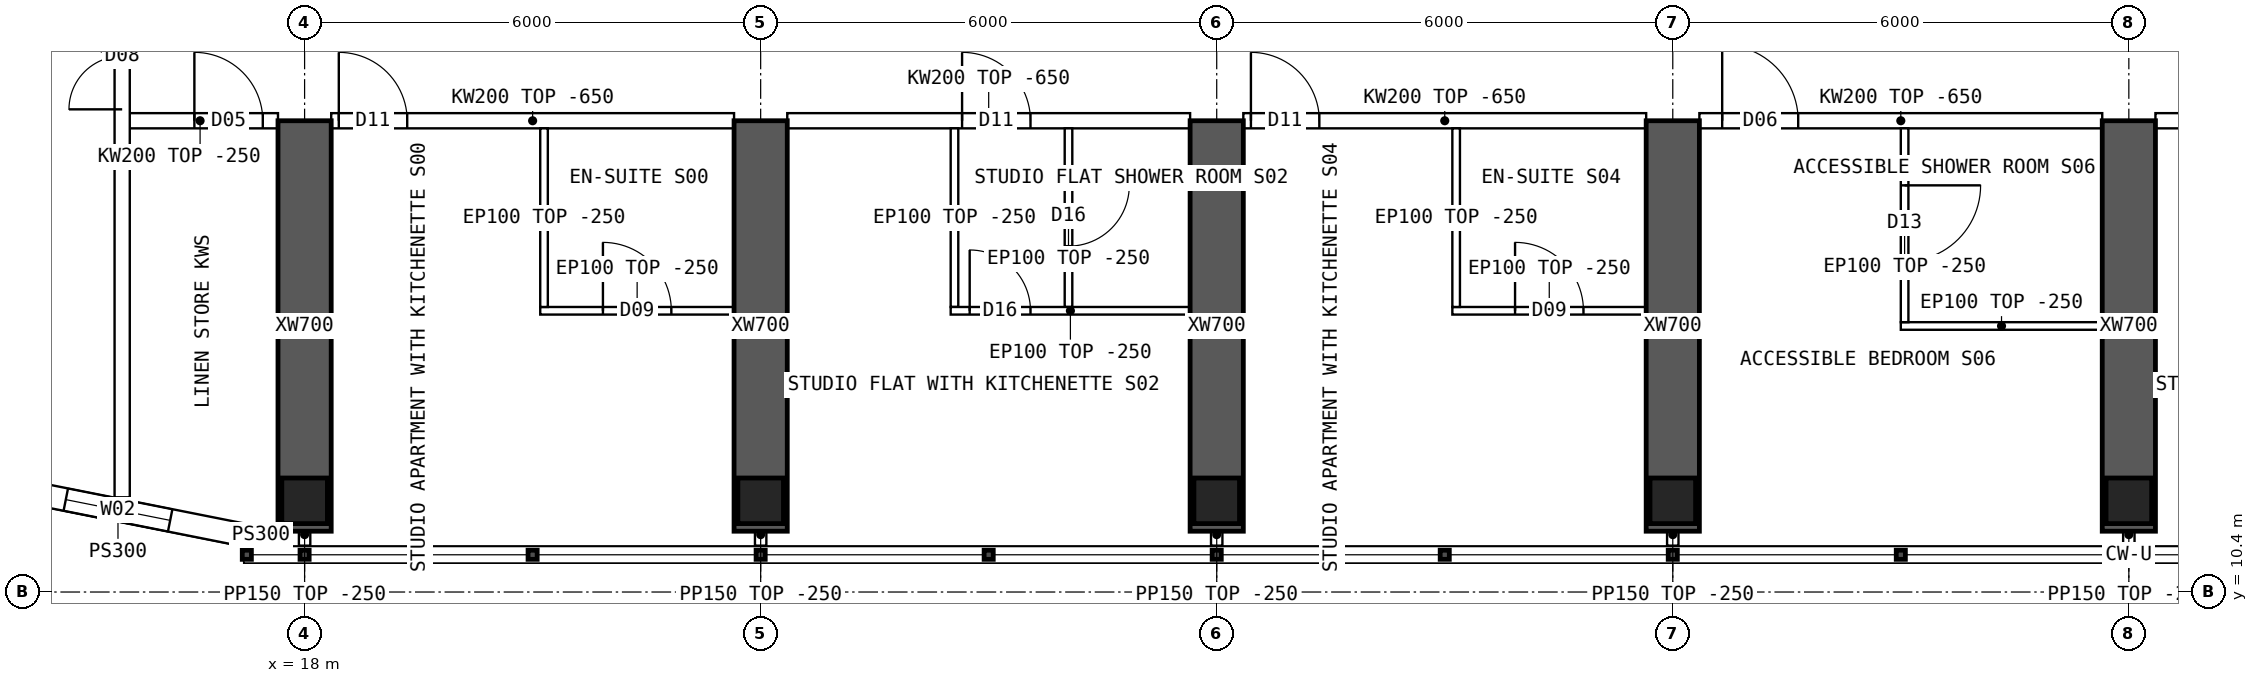
"""IFC4 building model, lengths in metres.
Left out: names, types, materials, properties, quantities, classifications, styles, units other than length and angle.
Written with IfcOpenShell. Run it as: python <this file> out.ifc"""

import sys

from ifc_helpers import new_model, si_unit, direction, frame, frame_2d, origin, origin_2d, place, context, subcontext, project, spatial, polyline, rectangle, hollow_rectangle, outline, extrude, element, fill, save


model = new_model("IFC4")
c1 = context("Model", 3, precision=1e-05, world=origin(), true_north=direction((0.0, 1.0)))
c2 = subcontext(c1, "Body", "Model", "MODEL_VIEW")
j1 = project(units=[si_unit("LENGTHUNIT", "METRE"), si_unit("PLANEANGLEUNIT", "RADIAN")], contexts=[c1])
p1 = place(None, origin())
s1 = spatial("IfcSite", under=j1, at=p1, CompositionType="ELEMENT")
p2 = place(p1, origin())
s2 = spatial("IfcBuilding", under=s1, at=p2, CompositionType="ELEMENT")
p3 = place(p2, frame((0.0, 0.0, 220.3)))
s3 = spatial("IfcBuildingStorey", under=s2, at=p3, CompositionType="ELEMENT", Elevation=220.3)
for number, where, z_axis, x_axis in (
    (1, (18.0, 11.6, 0.0), (0.0, 0.0, 1.0), (1.0, 0.0, 0.0)),
    (2, (24.0, 11.6, 0.0), (0.0, 0.0, 1.0), (1.0, 0.0, 0.0)),
    (3, (30.0, 11.6, 0.0), (0.0, 0.0, 1.0), (1.0, 0.0, 0.0)),
    (4, (36.0, 11.6, 0.0), (0.0, 0.0, 1.0), (1.0, 0.0, 0.0)),
    (5, (42.0, 11.6, 0.0), (0.0, 0.0, 1.0), (1.0, 0.0, 0.0)),
):
    element("IfcColumn", number, at=place(p3, frame(where, z_axis=z_axis, x_axis=x_axis)), inside=s3, PredefinedType="COLUMN", context=c2, shape_type="SweptSolid", body=[
        extrude(hollow_rectangle(XDim=0.6, YDim=0.6, WallThickness=0.06, at=origin_2d()), origin(), (0.0, 0.0, 1.0), 3.75),
    ])
for number, where, z_axis, x_axis in (
    (6, (18.0, 11.2, 0.0), (0.0, 0.0, 1.0), (0.0, 1.0, 0.0)),
    (7, (24.0, 11.2, 0.0), (0.0, 0.0, 1.0), (0.0, 1.0, 0.0)),
    (8, (30.0, 11.2, 0.0), (0.0, 0.0, 1.0), (0.0, 1.0, 0.0)),
    (9, (36.0, 11.2, 0.0), (0.0, 0.0, 1.0), (0.0, 1.0, 0.0)),
    (10, (42.0, 11.2, 0.0), (0.0, 0.0, 1.0), (0.0, 1.0, 0.0)),
):
    element("IfcWall", number, at=place(p3, frame(where, z_axis=z_axis, x_axis=x_axis)), inside=s3, PredefinedType="SHEAR", context=c2, shape_type="SweptSolid", body=[
        extrude(rectangle(XDim=5.4, YDim=0.7, at=frame_2d((2.7, 0.0))), origin(), (0.0, 0.0, 1.0), 3.75),
    ])
p4 = place(p3, frame((13.89, 11.808, 0.0), z_axis=(0.0, 0.0, 1.0), x_axis=(0.98078325777, -0.195100490205, 0.0)))
e11 = element("IfcWall", 11, at=p4, inside=s3, PredefinedType="SOLIDWALL", context=c2, shape_type="SweptSolid", body=[
    extrude(outline(polyline([(-0.03, -0.15), (3.405, -0.15), (3.345, 0.15), (0.03, 0.15), (-0.03, -0.15)])), origin(), (0.0, 0.0, 1.0), 3.5),
])
p5 = place(p4, frame((0.988, 0.0, 0.9)))
e12 = element("IfcOpeningElement", 12, at=p5, cuts=e11, PredefinedType="OPENING", context=c2, shape_type="SweptSolid", body=[
    extrude(rectangle(XDim=1.4, YDim=1.8, at=frame_2d((0.7, 0.9))), frame((0.0, 0.16, 0.0), z_axis=(0.0, -1.0, 0.0), x_axis=(1.0, 0.0, 0.0)), (0.0, 0.0, 1.0), 0.32),
])
p6 = place(p3, frame((17.2, 11.15, 0.0), z_axis=(0.0, 0.0, 1.0), x_axis=(1.0, 0.0, 0.0)))
e13 = element("IfcWall", 13, at=p6, inside=s3, PredefinedType="SOLIDWALL", context=c2, shape_type="SweptSolid", body=[
    extrude(rectangle(XDim=0.45, YDim=0.3, at=frame_2d((0.225, 0.0))), origin(), (0.0, 0.0, 1.0), 3.5),
])
p7 = place(p3, frame((15.6, 16.6, 0.0), z_axis=(0.0, 0.0, 1.0), x_axis=(1.0, 0.0, 0.0)))
e14 = element("IfcWall", 14, at=p7, inside=s3, PredefinedType="SOLIDWALL", context=c2, shape_type="SweptSolid", body=[
    extrude(rectangle(XDim=2.05, YDim=0.2, at=frame_2d((1.025, 0.0))), origin(), (0.0, 0.0, 1.0), 3.5),
])
p8 = place(p7, frame((0.95, 0.0, 0.0)))
e15 = element("IfcOpeningElement", 15, at=p8, cuts=e14, PredefinedType="OPENING", context=c2, shape_type="SweptSolid", body=[
    extrude(rectangle(XDim=0.9, YDim=2.1, at=frame_2d((0.45, 1.05))), frame((0.0, 0.11, 0.0), z_axis=(0.0, -1.0, 0.0), x_axis=(1.0, 0.0, 0.0)), (0.0, 0.0, 1.0), 0.22),
])
p9 = place(p3, frame((18.35, 16.6, 0.0), z_axis=(0.0, 0.0, 1.0), x_axis=(1.0, 0.0, 0.0)))
e16 = element("IfcWall", 16, at=p9, inside=s3, PredefinedType="SOLIDWALL", context=c2, shape_type="SweptSolid", body=[
    extrude(outline(polyline([(0.0, 0.0), (5.3, 0.0), (5.3, 3.1), (0.0, 3.1), (0.0, 0.0)])), frame((0.0, 0.1, 0.0), z_axis=(0.0, -1.0, 0.0), x_axis=(1.0, 0.0, 0.0)), (0.0, 0.0, 1.0), 0.2),
])
p10 = place(p9, frame((0.1, 0.0, 0.0)))
e17 = element("IfcOpeningElement", 17, at=p10, cuts=e16, PredefinedType="OPENING", context=c2, shape_type="SweptSolid", body=[
    extrude(rectangle(XDim=0.9, YDim=2.1, at=frame_2d((0.45, 1.05))), frame((0.0, 0.11, 0.0), z_axis=(0.0, -1.0, 0.0), x_axis=(1.0, 0.0, 0.0)), (0.0, 0.0, 1.0), 0.22),
])
p11 = place(p3, frame((24.35, 16.6, 0.0), z_axis=(0.0, 0.0, 1.0), x_axis=(1.0, 0.0, 0.0)))
e18 = element("IfcWall", 18, at=p11, inside=s3, PredefinedType="SOLIDWALL", context=c2, shape_type="SweptSolid", body=[
    extrude(outline(polyline([(0.0, 0.0), (5.3, 0.0), (5.3, 3.1), (0.0, 3.1), (0.0, 0.0)])), frame((0.0, 0.1, 0.0), z_axis=(0.0, -1.0, 0.0), x_axis=(1.0, 0.0, 0.0)), (0.0, 0.0, 1.0), 0.2),
])
p12 = place(p11, frame((2.3, 0.0, 0.0)))
e19 = element("IfcOpeningElement", 19, at=p12, cuts=e18, PredefinedType="OPENING", context=c2, shape_type="SweptSolid", body=[
    extrude(rectangle(XDim=0.9, YDim=2.1, at=frame_2d((0.45, 1.05))), frame((0.0, 0.11, 0.0), z_axis=(0.0, -1.0, 0.0), x_axis=(1.0, 0.0, 0.0)), (0.0, 0.0, 1.0), 0.22),
])
p13 = place(p3, frame((30.35, 16.6, 0.0), z_axis=(0.0, 0.0, 1.0), x_axis=(1.0, 0.0, 0.0)))
e20 = element("IfcWall", 20, at=p13, inside=s3, PredefinedType="SOLIDWALL", context=c2, shape_type="SweptSolid", body=[
    extrude(outline(polyline([(0.0, 0.0), (5.3, 0.0), (5.3, 3.1), (0.0, 3.1), (0.0, 0.0)])), frame((0.0, 0.1, 0.0), z_axis=(0.0, -1.0, 0.0), x_axis=(1.0, 0.0, 0.0)), (0.0, 0.0, 1.0), 0.2),
])
p14 = place(p13, frame((0.1, 0.0, 0.0)))
e21 = element("IfcOpeningElement", 21, at=p14, cuts=e20, PredefinedType="OPENING", context=c2, shape_type="SweptSolid", body=[
    extrude(rectangle(XDim=0.9, YDim=2.1, at=frame_2d((0.45, 1.05))), frame((0.0, 0.11, 0.0), z_axis=(0.0, -1.0, 0.0), x_axis=(1.0, 0.0, 0.0)), (0.0, 0.0, 1.0), 0.22),
])
p15 = place(p3, frame((36.35, 16.6, 0.0), z_axis=(0.0, 0.0, 1.0), x_axis=(1.0, 0.0, 0.0)))
e22 = element("IfcWall", 22, at=p15, inside=s3, PredefinedType="SOLIDWALL", context=c2, shape_type="SweptSolid", body=[
    extrude(outline(polyline([(0.0, 0.0), (5.3, 0.0), (5.3, 3.1), (0.0, 3.1), (0.0, 0.0)])), frame((0.0, 0.1, 0.0), z_axis=(0.0, -1.0, 0.0), x_axis=(1.0, 0.0, 0.0)), (0.0, 0.0, 1.0), 0.2),
])
p16 = place(p15, frame((0.3, 0.0, 0.0)))
e23 = element("IfcOpeningElement", 23, at=p16, cuts=e22, PredefinedType="OPENING", context=c2, shape_type="SweptSolid", body=[
    extrude(rectangle(XDim=1.0, YDim=2.1, at=frame_2d((0.5, 1.05))), frame((0.0, 0.11, 0.0), z_axis=(0.0, -1.0, 0.0), x_axis=(1.0, 0.0, 0.0)), (0.0, 0.0, 1.0), 0.22),
])
p17 = place(p3, frame((42.35, 16.6, 0.0), z_axis=(0.0, 0.0, 1.0), x_axis=(1.0, 0.0, 0.0)))
e24 = element("IfcWall", 24, at=p17, inside=s3, PredefinedType="SOLIDWALL", context=c2, shape_type="SweptSolid", body=[
    extrude(outline(polyline([(0.0, 0.0), (5.3, 0.0), (5.3, 3.1), (0.0, 3.1), (0.0, 0.0)])), frame((0.0, 0.1, 0.0), z_axis=(0.0, -1.0, 0.0), x_axis=(1.0, 0.0, 0.0)), (0.0, 0.0, 1.0), 0.2),
])
p18 = place(p17, frame((2.3, 0.0, 0.0)))
e25 = element("IfcOpeningElement", 25, at=p18, cuts=e24, PredefinedType="OPENING", context=c2, shape_type="SweptSolid", body=[
    extrude(rectangle(XDim=0.9, YDim=2.1, at=frame_2d((0.45, 1.05))), frame((0.0, 0.11, 0.0), z_axis=(0.0, -1.0, 0.0), x_axis=(1.0, 0.0, 0.0)), (0.0, 0.0, 1.0), 0.22),
])
p19 = place(p3, frame((23.65, 14.1, 0.0), z_axis=(0.0, 0.0, 1.0), x_axis=(-1.0, 0.0, 0.0)))
e26 = element("IfcWall", 26, at=p19, inside=s3, PredefinedType="PARTITIONING", context=c2, shape_type="SweptSolid", body=[
    extrude(rectangle(XDim=2.55, YDim=0.1, at=frame_2d((1.275, 0.0))), origin(), (0.0, 0.0, 1.0), 3.5),
])
p20 = place(p19, frame((0.825, 0.0, 0.0)))
e27 = element("IfcOpeningElement", 27, at=p20, cuts=e26, PredefinedType="OPENING", context=c2, shape_type="SweptSolid", body=[
    extrude(rectangle(XDim=0.9, YDim=2.1, at=frame_2d((0.45, 1.05))), frame((0.0, 0.06, 0.0), z_axis=(0.0, -1.0, 0.0), x_axis=(1.0, 0.0, 0.0)), (0.0, 0.0, 1.0), 0.12),
])
p21 = place(p3, frame((21.15, 14.15, 0.0), z_axis=(0.0, 0.0, 1.0), x_axis=(0.0, 1.0, 0.0)))
e28 = element("IfcWall", 28, at=p21, inside=s3, PredefinedType="PARTITIONING", context=c2, shape_type="SweptSolid", body=[
    extrude(outline(polyline([(0.0, 0.0), (2.35, 0.0), (2.35, 3.1), (2.302, 3.1), (2.3, 3.5), (0.0, 3.5), (0.0, 0.0)])), frame((0.0, 0.05, 0.0), z_axis=(0.0, -1.0, 0.0), x_axis=(1.0, 0.0, 0.0)), (0.0, 0.0, 1.0), 0.1),
])
p22 = place(p3, frame((29.65, 14.1, 0.0), z_axis=(0.0, 0.0, 1.0), x_axis=(-1.0, 0.0, 0.0)))
e29 = element("IfcWall", 29, at=p22, inside=s3, PredefinedType="PARTITIONING", context=c2, shape_type="SweptSolid", body=[
    extrude(rectangle(XDim=3.15, YDim=0.1, at=frame_2d((1.575, 0.0))), origin(), (0.0, 0.0, 1.0), 3.5),
])
p23 = place(p22, frame((2.1, 0.0, 0.0)))
e30 = element("IfcOpeningElement", 30, at=p23, cuts=e29, PredefinedType="OPENING", context=c2, shape_type="SweptSolid", body=[
    extrude(rectangle(XDim=0.8, YDim=2.1, at=frame_2d((0.4, 1.05))), frame((0.0, 0.06, 0.0), z_axis=(0.0, -1.0, 0.0), x_axis=(1.0, 0.0, 0.0)), (0.0, 0.0, 1.0), 0.12),
])
p24 = place(p3, frame((26.55, 14.15, 0.0), z_axis=(0.0, 0.0, 1.0), x_axis=(0.0, 1.0, 0.0)))
e31 = element("IfcWall", 31, at=p24, inside=s3, PredefinedType="PARTITIONING", context=c2, shape_type="SweptSolid", body=[
    extrude(outline(polyline([(0.0, 0.0), (2.35, 0.0), (2.35, 3.1), (2.302, 3.1), (2.3, 3.5), (0.0, 3.5), (0.0, 0.0)])), frame((0.0, 0.05, 0.0), z_axis=(0.0, -1.0, 0.0), x_axis=(1.0, 0.0, 0.0)), (0.0, 0.0, 1.0), 0.1),
])
p25 = place(p3, frame((28.05, 14.15, 0.0), z_axis=(0.0, 0.0, 1.0), x_axis=(0.0, 1.0, 0.0)))
e32 = element("IfcWall", 32, at=p25, inside=s3, PredefinedType="PARTITIONING", context=c2, shape_type="SweptSolid", body=[
    extrude(outline(polyline([(0.0, 0.0), (2.35, 0.0), (2.35, 3.1), (2.302, 3.1), (2.3, 3.5), (0.0, 3.5), (0.0, 0.0)])), frame((0.0, 0.05, 0.0), z_axis=(0.0, -1.0, 0.0), x_axis=(1.0, 0.0, 0.0)), (0.0, 0.0, 1.0), 0.1),
])
p26 = place(p25, frame((0.8, 0.0, 0.0)))
e33 = element("IfcOpeningElement", 33, at=p26, cuts=e32, PredefinedType="OPENING", context=c2, shape_type="SweptSolid", body=[
    extrude(rectangle(XDim=0.8, YDim=2.1, at=frame_2d((0.4, 1.05))), frame((0.0, 0.06, 0.0), z_axis=(0.0, -1.0, 0.0), x_axis=(1.0, 0.0, 0.0)), (0.0, 0.0, 1.0), 0.12),
])
p27 = place(p3, frame((35.65, 14.1, 0.0), z_axis=(0.0, 0.0, 1.0), x_axis=(-1.0, 0.0, 0.0)))
e34 = element("IfcWall", 34, at=p27, inside=s3, PredefinedType="PARTITIONING", context=c2, shape_type="SweptSolid", body=[
    extrude(rectangle(XDim=2.55, YDim=0.1, at=frame_2d((1.275, 0.0))), origin(), (0.0, 0.0, 1.0), 3.5),
])
p28 = place(p27, frame((0.825, 0.0, 0.0)))
e35 = element("IfcOpeningElement", 35, at=p28, cuts=e34, PredefinedType="OPENING", context=c2, shape_type="SweptSolid", body=[
    extrude(rectangle(XDim=0.9, YDim=2.1, at=frame_2d((0.45, 1.05))), frame((0.0, 0.06, 0.0), z_axis=(0.0, -1.0, 0.0), x_axis=(1.0, 0.0, 0.0)), (0.0, 0.0, 1.0), 0.12),
])
p29 = place(p3, frame((33.15, 14.15, 0.0), z_axis=(0.0, 0.0, 1.0), x_axis=(0.0, 1.0, 0.0)))
e36 = element("IfcWall", 36, at=p29, inside=s3, PredefinedType="PARTITIONING", context=c2, shape_type="SweptSolid", body=[
    extrude(outline(polyline([(0.0, 0.0), (2.35, 0.0), (2.35, 3.1), (2.302, 3.1), (2.3, 3.5), (0.0, 3.5), (0.0, 0.0)])), frame((0.0, 0.05, 0.0), z_axis=(0.0, -1.0, 0.0), x_axis=(1.0, 0.0, 0.0)), (0.0, 0.0, 1.0), 0.1),
])
p30 = place(p3, frame((39.0, 13.9, 0.0), z_axis=(0.0, 0.0, 1.0), x_axis=(1.0, 0.0, 0.0)))
e37 = element("IfcWall", 37, at=p30, inside=s3, PredefinedType="PARTITIONING", context=c2, shape_type="SweptSolid", body=[
    extrude(rectangle(XDim=2.65, YDim=0.1, at=frame_2d((1.325, 0.0))), origin(), (0.0, 0.0, 1.0), 3.5),
])
p31 = place(p3, frame((39.05, 13.95, 0.0), z_axis=(0.0, 0.0, 1.0), x_axis=(0.0, 1.0, 0.0)))
e38 = element("IfcWall", 38, at=p31, inside=s3, PredefinedType="PARTITIONING", context=c2, shape_type="SweptSolid", body=[
    extrude(outline(polyline([(0.0, 0.0), (2.55, 0.0), (2.55, 3.1), (2.502, 3.1), (2.5, 3.5), (0.0, 3.5), (0.0, 0.0)])), frame((0.0, 0.05, 0.0), z_axis=(0.0, -1.0, 0.0), x_axis=(1.0, 0.0, 0.0)), (0.0, 0.0, 1.0), 0.1),
])
p32 = place(p31, frame((0.8, 0.0, 0.0)))
e39 = element("IfcOpeningElement", 39, at=p32, cuts=e38, PredefinedType="OPENING", context=c2, shape_type="SweptSolid", body=[
    extrude(rectangle(XDim=1.0, YDim=2.1, at=frame_2d((0.5, 1.05))), frame((0.0, 0.06, 0.0), z_axis=(0.0, -1.0, 0.0), x_axis=(1.0, 0.0, 0.0)), (0.0, 0.0, 1.0), 0.12),
])
p33 = place(p3, frame((15.6, 11.646, 0.0), z_axis=(0.0, 0.0, 1.0), x_axis=(0.0, 1.0, 0.0)))
e40 = element("IfcWall", 40, at=p33, inside=s3, PredefinedType="SOLIDWALL", context=c2, shape_type="SweptSolid", body=[
    extrude(rectangle(XDim=40.708, YDim=0.2, at=frame_2d((20.354, 0.0))), origin(), (0.0, 0.0, 1.0), 3.5),
])
p34 = place(p33, frame((13.434, 0.0, 0.0)))
e41 = element("IfcOpeningElement", 41, at=p34, cuts=e40, PredefinedType="OPENING", context=c2, shape_type="SweptSolid", body=[
    extrude(rectangle(XDim=1.2, YDim=2.1, at=frame_2d((0.6, 1.05))), frame((0.0, 0.11, 0.0), z_axis=(0.0, -1.0, 0.0), x_axis=(1.0, 0.0, 0.0)), (0.0, 0.0, 1.0), 0.22),
])
p35 = place(p33, frame((5.104, 0.0, 0.0)))
e42 = element("IfcOpeningElement", 42, at=p35, cuts=e40, PredefinedType="OPENING", context=c2, shape_type="SweptSolid", body=[
    extrude(rectangle(XDim=1.4, YDim=2.1, at=frame_2d((0.7, 1.05))), frame((0.0, 0.11, 0.0), z_axis=(0.0, -1.0, 0.0), x_axis=(1.0, 0.0, 0.0)), (0.0, 0.0, 1.0), 0.22),
])
p36 = place(p33, frame((34.104, 0.0, 0.0)))
e43 = element("IfcOpeningElement", 43, at=p36, cuts=e40, PredefinedType="OPENING", context=c2, shape_type="SweptSolid", body=[
    extrude(rectangle(XDim=1.4, YDim=2.1, at=frame_2d((0.7, 1.05))), frame((0.0, 0.11, 0.0), z_axis=(0.0, -1.0, 0.0), x_axis=(1.0, 0.0, 0.0)), (0.0, 0.0, 1.0), 0.22),
])
for number, where, z_axis, x_axis in (
    (44, (18.0, 11.3, 0.0), (0.0, 0.0, 1.0), (0.0, -1.0, 0.0)),
    (45, (24.0, 11.3, 0.0), (0.0, 0.0, 1.0), (0.0, -1.0, 0.0)),
    (46, (30.0, 11.3, 0.0), (0.0, 0.0, 1.0), (0.0, -1.0, 0.0)),
    (47, (36.0, 11.3, 0.0), (0.0, 0.0, 1.0), (0.0, -1.0, 0.0)),
    (48, (42.0, 11.3, 0.0), (0.0, 0.0, 1.0), (0.0, -1.0, 0.0)),
):
    element("IfcWall", number, at=place(p3, frame(where, z_axis=z_axis, x_axis=x_axis)), inside=s3, PredefinedType="PARTITIONING", context=c2, shape_type="SweptSolid", body=[
        extrude(rectangle(XDim=0.29, YDim=0.15, at=frame_2d((0.145, 0.0))), origin(), (0.0, 0.0, 1.0), 3.5),
    ])
p37 = place(p5, origin())
e49 = element("IfcWindow", 49, at=p37, inside=s3, PartitioningType="SINGLE_PANEL", PredefinedType="WINDOW", context=c2, shape_type="SweptSolid", body=[
    extrude(rectangle(XDim=1.4, YDim=1.8, at=frame_2d((0.7, 0.9))), frame((0.0, 0.03, 0.0), z_axis=(0.0, -1.0, 0.0), x_axis=(1.0, 0.0, 0.0)), (0.0, 0.0, 1.0), 0.06),
])
fill(e12, e49)
p38 = place(p20, origin())
e50 = element("IfcDoor", 50, at=p38, inside=s3, OperationType="SINGLE_SWING_RIGHT", PredefinedType="DOOR", context=c2, shape_type="SweptSolid", body=[
    extrude(rectangle(XDim=0.9, YDim=2.1, at=frame_2d((0.45, 1.05))), frame((0.0, 0.025, 0.0), z_axis=(0.0, -1.0, 0.0), x_axis=(1.0, 0.0, 0.0)), (0.0, 0.0, 1.0), 0.05),
])
fill(e27, e50)
p39 = place(p10, origin())
e51 = element("IfcDoor", 51, at=p39, inside=s3, OperationType="SINGLE_SWING_LEFT", PredefinedType="DOOR", context=c2, shape_type="SweptSolid", body=[
    extrude(rectangle(XDim=0.9, YDim=2.1, at=frame_2d((0.45, 1.05))), frame((0.0, 0.025, 0.0), z_axis=(0.0, -1.0, 0.0), x_axis=(1.0, 0.0, 0.0)), (0.0, 0.0, 1.0), 0.05),
])
fill(e17, e51)
p40 = place(p23, origin())
e52 = element("IfcDoor", 52, at=p40, inside=s3, OperationType="SINGLE_SWING_RIGHT", PredefinedType="DOOR", context=c2, shape_type="SweptSolid", body=[
    extrude(rectangle(XDim=0.8, YDim=2.1, at=frame_2d((0.4, 1.05))), frame((0.0, 0.025, 0.0), z_axis=(0.0, -1.0, 0.0), x_axis=(1.0, 0.0, 0.0)), (0.0, 0.0, 1.0), 0.05),
])
fill(e30, e52)
p41 = place(p26, origin())
e53 = element("IfcDoor", 53, at=p41, inside=s3, OperationType="SINGLE_SWING_RIGHT", PredefinedType="DOOR", context=c2, shape_type="SweptSolid", body=[
    extrude(rectangle(XDim=0.8, YDim=2.1, at=frame_2d((0.4, 1.05))), frame((0.0, 0.025, 0.0), z_axis=(0.0, -1.0, 0.0), x_axis=(1.0, 0.0, 0.0)), (0.0, 0.0, 1.0), 0.05),
])
fill(e33, e53)
p42 = place(p12, origin())
e54 = element("IfcDoor", 54, at=p42, inside=s3, OperationType="SINGLE_SWING_LEFT", PredefinedType="DOOR", context=c2, shape_type="SweptSolid", body=[
    extrude(rectangle(XDim=0.9, YDim=2.1, at=frame_2d((0.45, 1.05))), frame((0.0, 0.025, 0.0), z_axis=(0.0, -1.0, 0.0), x_axis=(1.0, 0.0, 0.0)), (0.0, 0.0, 1.0), 0.05),
])
fill(e19, e54)
p43 = place(p28, origin())
e55 = element("IfcDoor", 55, at=p43, inside=s3, OperationType="SINGLE_SWING_RIGHT", PredefinedType="DOOR", context=c2, shape_type="SweptSolid", body=[
    extrude(rectangle(XDim=0.9, YDim=2.1, at=frame_2d((0.45, 1.05))), frame((0.0, 0.025, 0.0), z_axis=(0.0, -1.0, 0.0), x_axis=(1.0, 0.0, 0.0)), (0.0, 0.0, 1.0), 0.05),
])
fill(e35, e55)
p44 = place(p14, origin())
e56 = element("IfcDoor", 56, at=p44, inside=s3, OperationType="SINGLE_SWING_LEFT", PredefinedType="DOOR", context=c2, shape_type="SweptSolid", body=[
    extrude(rectangle(XDim=0.9, YDim=2.1, at=frame_2d((0.45, 1.05))), frame((0.0, 0.025, 0.0), z_axis=(0.0, -1.0, 0.0), x_axis=(1.0, 0.0, 0.0)), (0.0, 0.0, 1.0), 0.05),
])
fill(e21, e56)
p45 = place(p32, origin())
e57 = element("IfcDoor", 57, at=p45, inside=s3, OperationType="SINGLE_SWING_RIGHT", PredefinedType="DOOR", context=c2, shape_type="SweptSolid", body=[
    extrude(rectangle(XDim=1.0, YDim=2.1, at=frame_2d((0.5, 1.05))), frame((0.0, 0.025, 0.0), z_axis=(0.0, -1.0, 0.0), x_axis=(1.0, 0.0, 0.0)), (0.0, 0.0, 1.0), 0.05),
])
fill(e39, e57)
p46 = place(p16, origin())
e58 = element("IfcDoor", 58, at=p46, inside=s3, OperationType="SINGLE_SWING_LEFT", PredefinedType="DOOR", context=c2, shape_type="SweptSolid", body=[
    extrude(rectangle(XDim=1.0, YDim=2.1, at=frame_2d((0.5, 1.05))), frame((0.0, 0.025, 0.0), z_axis=(0.0, -1.0, 0.0), x_axis=(1.0, 0.0, 0.0)), (0.0, 0.0, 1.0), 0.05),
])
fill(e23, e58)
p47 = place(p35, origin())
e59 = element("IfcDoor", 59, at=p47, inside=s3, OperationType="DOUBLE_DOOR_SINGLE_SWING", PredefinedType="DOOR", context=c2, shape_type="SweptSolid", body=[
    extrude(rectangle(XDim=1.4, YDim=2.1, at=frame_2d((0.7, 1.05))), frame((0.0, 0.025, 0.0), z_axis=(0.0, -1.0, 0.0), x_axis=(1.0, 0.0, 0.0)), (0.0, 0.0, 1.0), 0.05),
])
fill(e42, e59)
p48 = place(p8, origin())
e60 = element("IfcDoor", 60, at=p48, inside=s3, OperationType="SINGLE_SWING_LEFT", PredefinedType="DOOR", context=c2, shape_type="SweptSolid", body=[
    extrude(rectangle(XDim=0.9, YDim=2.1, at=frame_2d((0.45, 1.05))), frame((0.0, 0.025, 0.0), z_axis=(0.0, -1.0, 0.0), x_axis=(1.0, 0.0, 0.0)), (0.0, 0.0, 1.0), 0.05),
])
fill(e15, e60)
save(model, sys.argv[1])
